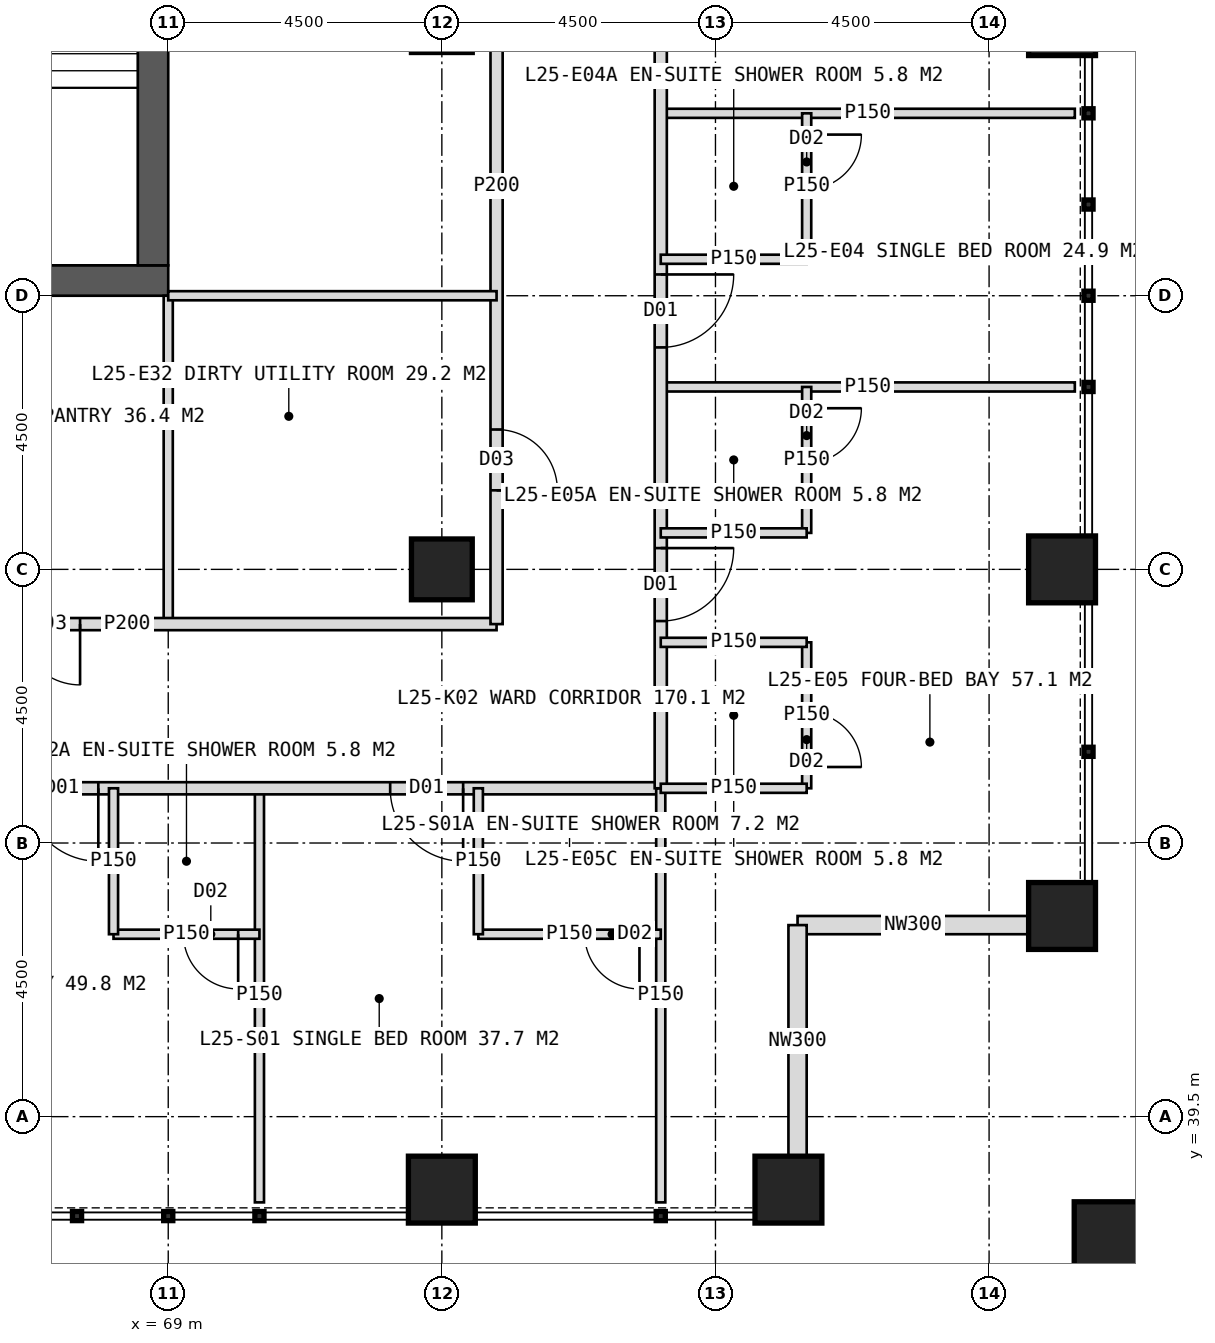
"""IFC4 building model, lengths in metres.
Left out: names, types, materials, properties, quantities, classifications, styles, units other than length and angle.
Written with IfcOpenShell. Run it as: python <this file> out.ifc"""

import sys

from ifc_helpers import new_model, si_unit, direction, frame, frame_2d, origin, origin_2d, place, context, subcontext, project, spatial, rectangle, hollow_rectangle, extrude, element, fill, save


model = new_model("IFC4")
c1 = context("Model", 3, precision=1e-05, world=origin(), true_north=direction((0.0, 1.0)))
c2 = subcontext(c1, "Body", "Model", "MODEL_VIEW")
j1 = project(units=[si_unit("LENGTHUNIT", "METRE"), si_unit("PLANEANGLEUNIT", "RADIAN")], contexts=[c1])
p1 = place(None, origin())
s1 = spatial("IfcSite", under=j1, at=p1, CompositionType="ELEMENT")
p2 = place(p1, origin())
s2 = spatial("IfcBuilding", under=s1, at=p2, CompositionType="ELEMENT")
p3 = place(p2, frame((0.0, 0.0, 108.0)))
s3 = spatial("IfcBuildingStorey", under=s2, at=p3, CompositionType="ELEMENT", Elevation=108.0)
p4 = place(p3, frame((51.0, 53.25, 0.0), z_axis=(0.0, 0.0, 1.0), x_axis=(1.0, 0.0, 0.0)))
e1 = element("IfcWall", 1, at=p4, inside=s3, PredefinedType="SHEAR", context=c2, shape_type="SweptSolid", body=[
    extrude(rectangle(XDim=18.0, YDim=0.5, at=frame_2d((9.0, 0.0))), origin(), (0.0, 0.0, 1.0), 4.0),
])
p5 = place(p4, frame((8.1, 0.0, 0.0)))
e2 = element("IfcOpeningElement", 2, at=p5, cuts=e1, PredefinedType="OPENING", context=c2, shape_type="SweptSolid", body=[
    extrude(rectangle(XDim=1.8, YDim=2.2, at=frame_2d((0.9, 1.1))), frame((0.0, 0.26, 0.0), z_axis=(0.0, -1.0, 0.0), x_axis=(1.0, 0.0, 0.0)), (0.0, 0.0, 1.0), 0.52),
])
p6 = place(p3, frame((68.75, 53.5, 0.0), z_axis=(0.0, 0.0, 1.0), x_axis=(0.0, 1.0, 0.0)))
e3 = element("IfcWall", 3, at=p6, inside=s3, PredefinedType="SHEAR", context=c2, shape_type="SweptSolid", body=[
    extrude(rectangle(XDim=17.0, YDim=0.5, at=frame_2d((8.5, 0.0))), origin(), (0.0, 0.0, 1.0), 4.0),
])
p7 = place(p6, frame((9.5, 0.0, 0.0)))
e4 = element("IfcOpeningElement", 4, at=p7, cuts=e3, PredefinedType="OPENING", context=c2, shape_type="SweptSolid", body=[
    extrude(rectangle(XDim=1.5, YDim=2.2, at=frame_2d((0.75, 1.1))), frame((0.0, 0.26, 0.0), z_axis=(0.0, -1.0, 0.0), x_axis=(1.0, 0.0, 0.0)), (0.0, 0.0, 1.0), 0.52),
])
p8 = place(p3, frame((73.5, 48.5, 0.0), z_axis=(0.0, 0.0, 1.0), x_axis=(1.0, 0.0, 0.0)))
e5 = element("IfcColumn", 5, at=p8, inside=s3, PredefinedType="COLUMN", context=c2, shape_type="SweptSolid", body=[
    extrude(hollow_rectangle(XDim=1.0, YDim=1.0, WallThickness=0.1, at=origin_2d()), origin(), (0.0, 0.0, 1.0), 4.0),
])
for number, where, z_axis, x_axis in (
    (6, (83.7, 42.8, 0.0), (0.0, 0.0, 1.0), (1.0, 0.0, 0.0)),
    (7, (83.7, 48.5, 0.0), (0.0, 0.0, 1.0), (1.0, 0.0, 0.0)),
    (8, (83.7, 57.5, 0.0), (0.0, 0.0, 1.0), (1.0, 0.0, 0.0)),
    (9, (73.5, 38.3, 0.0), (0.0, 0.0, 1.0), (1.0, 0.0, 0.0)),
    (10, (79.2, 38.3, 0.0), (0.0, 0.0, 1.0), (1.0, 0.0, 0.0)),
):
    element("IfcColumn", number, at=place(p3, frame(where, z_axis=z_axis, x_axis=x_axis)), inside=s3, PredefinedType="COLUMN", context=c2, shape_type="SweptSolid", body=[
        extrude(hollow_rectangle(XDim=1.1, YDim=1.1, WallThickness=0.1, at=origin_2d()), origin(), (0.0, 0.0, 1.0), 4.0),
    ])
p9 = place(p3, frame((84.6, 37.4, 0.0), z_axis=(0.0, 0.0, 1.0), x_axis=(1.0, 0.0, 0.0)))
e11 = element("IfcColumn", 11, at=p9, inside=s3, PredefinedType="COLUMN", context=c2, shape_type="SweptSolid", body=[
    extrude(hollow_rectangle(XDim=1.4, YDim=1.4, WallThickness=0.08, at=origin_2d()), origin(), (0.0, 0.0, 1.0), 4.0),
])
for number, where, z_axis, x_axis in (
    (12, (83.15, 42.65, 0.0), (0.0, 0.0, 1.0), (-1.0, 0.0, 0.0)),
    (13, (79.35, 42.65, 0.0), (0.0, 0.0, 1.0), (0.0, -1.0, 0.0)),
):
    element("IfcWall", number, at=place(p3, frame(where, z_axis=z_axis, x_axis=x_axis)), inside=s3, PredefinedType="ELEMENTEDWALL", context=c2, shape_type="SweptSolid", body=[
        extrude(rectangle(XDim=3.8, YDim=0.3, at=frame_2d((1.9, 0.0))), origin(), (0.0, 0.0, 1.0), 4.0),
    ])
p10 = place(p3, frame((70.5, 44.9, 0.0), z_axis=(0.0, 0.0, 1.0), x_axis=(0.0, -1.0, 0.0)))
e14 = element("IfcWall", 14, at=p10, inside=s3, PredefinedType="PARTITIONING", context=c2, shape_type="SweptSolid", body=[
    extrude(rectangle(XDim=6.81, YDim=0.15, at=frame_2d((3.405, 0.0))), origin(), (0.0, 0.0, 1.0), 3.75),
])
p11 = place(p3, frame((77.1, 44.9, 0.0), z_axis=(0.0, 0.0, 1.0), x_axis=(-1.0, 0.0, 0.0)))
e15 = element("IfcWall", 15, at=p11, inside=s3, PredefinedType="PARTITIONING", context=c2, shape_type="SweptSolid", body=[
    extrude(rectangle(XDim=34.2, YDim=0.2, at=frame_2d((17.1, 0.0))), origin(), (0.0, 0.0, 1.0), 3.75),
])
p12 = place(p11, frame((3.25, 0.0, 0.0)))
e16 = element("IfcOpeningElement", 16, at=p12, cuts=e15, PredefinedType="OPENING", context=c2, shape_type="SweptSolid", body=[
    extrude(rectangle(XDim=1.2, YDim=2.2, at=frame_2d((0.6, 1.1))), frame((0.0, 0.11, 0.0), z_axis=(0.0, -1.0, 0.0), x_axis=(1.0, 0.0, 0.0)), (0.0, 0.0, 1.0), 0.22),
])
p13 = place(p11, frame((9.25, 0.0, 0.0)))
e17 = element("IfcOpeningElement", 17, at=p13, cuts=e15, PredefinedType="OPENING", context=c2, shape_type="SweptSolid", body=[
    extrude(rectangle(XDim=1.2, YDim=2.2, at=frame_2d((0.6, 1.1))), frame((0.0, 0.11, 0.0), z_axis=(0.0, -1.0, 0.0), x_axis=(1.0, 0.0, 0.0)), (0.0, 0.0, 1.0), 0.22),
])
p14 = place(p11, frame((18.25, 0.0, 0.0)))
e18 = element("IfcOpeningElement", 18, at=p14, cuts=e15, PredefinedType="OPENING", context=c2, shape_type="SweptSolid", body=[
    extrude(rectangle(XDim=1.2, YDim=2.2, at=frame_2d((0.6, 1.1))), frame((0.0, 0.11, 0.0), z_axis=(0.0, -1.0, 0.0), x_axis=(1.0, 0.0, 0.0)), (0.0, 0.0, 1.0), 0.22),
])
p15 = place(p11, frame((27.25, 0.0, 0.0)))
e19 = element("IfcOpeningElement", 19, at=p15, cuts=e15, PredefinedType="OPENING", context=c2, shape_type="SweptSolid", body=[
    extrude(rectangle(XDim=1.2, YDim=2.2, at=frame_2d((0.6, 1.1))), frame((0.0, 0.11, 0.0), z_axis=(0.0, -1.0, 0.0), x_axis=(1.0, 0.0, 0.0)), (0.0, 0.0, 1.0), 0.22),
])
p16 = place(p3, frame((77.1, 44.9, 0.0), z_axis=(0.0, 0.0, 1.0), x_axis=(0.0, -1.0, 0.0)))
e20 = element("IfcWall", 20, at=p16, inside=s3, PredefinedType="PARTITIONING", context=c2, shape_type="SweptSolid", body=[
    extrude(rectangle(XDim=6.81, YDim=0.15, at=frame_2d((3.405, 0.0))), origin(), (0.0, 0.0, 1.0), 3.75),
])
p17 = place(p3, frame((77.1, 42.5, 0.0), z_axis=(0.0, 0.0, 1.0), x_axis=(-1.0, 0.0, 0.0)))
e21 = element("IfcWall", 21, at=p17, inside=s3, PredefinedType="PARTITIONING", context=c2, shape_type="SweptSolid", body=[
    extrude(rectangle(XDim=3.0, YDim=0.15, at=frame_2d((1.5, 0.0))), origin(), (0.0, 0.0, 1.0), 3.75),
])
p18 = place(p17, frame((0.35, 0.0, 0.0)))
e22 = element("IfcOpeningElement", 22, at=p18, cuts=e21, PredefinedType="OPENING", context=c2, shape_type="SweptSolid", body=[
    extrude(rectangle(XDim=0.9, YDim=2.1, at=frame_2d((0.45, 1.05))), frame((0.0, 0.085, 0.0), z_axis=(0.0, -1.0, 0.0), x_axis=(1.0, 0.0, 0.0)), (0.0, 0.0, 1.0), 0.17),
])
p19 = place(p3, frame((74.1, 44.9, 0.0), z_axis=(0.0, 0.0, 1.0), x_axis=(0.0, -1.0, 0.0)))
e23 = element("IfcWall", 23, at=p19, inside=s3, PredefinedType="PARTITIONING", context=c2, shape_type="SweptSolid", body=[
    extrude(rectangle(XDim=2.4, YDim=0.15, at=frame_2d((1.2, 0.0))), origin(), (0.0, 0.0, 1.0), 3.75),
])
p20 = place(p3, frame((70.5, 42.5, 0.0), z_axis=(0.0, 0.0, 1.0), x_axis=(-1.0, 0.0, 0.0)))
e24 = element("IfcWall", 24, at=p20, inside=s3, PredefinedType="PARTITIONING", context=c2, shape_type="SweptSolid", body=[
    extrude(rectangle(XDim=2.4, YDim=0.15, at=frame_2d((1.2, 0.0))), origin(), (0.0, 0.0, 1.0), 3.75),
])
p21 = place(p20, frame((0.35, 0.0, 0.0)))
e25 = element("IfcOpeningElement", 25, at=p21, cuts=e24, PredefinedType="OPENING", context=c2, shape_type="SweptSolid", body=[
    extrude(rectangle(XDim=0.9, YDim=2.1, at=frame_2d((0.45, 1.05))), frame((0.0, 0.085, 0.0), z_axis=(0.0, -1.0, 0.0), x_axis=(1.0, 0.0, 0.0)), (0.0, 0.0, 1.0), 0.17),
])
p22 = place(p3, frame((68.1, 44.9, 0.0), z_axis=(0.0, 0.0, 1.0), x_axis=(0.0, -1.0, 0.0)))
e26 = element("IfcWall", 26, at=p22, inside=s3, PredefinedType="PARTITIONING", context=c2, shape_type="SweptSolid", body=[
    extrude(rectangle(XDim=2.4, YDim=0.15, at=frame_2d((1.2, 0.0))), origin(), (0.0, 0.0, 1.0), 3.75),
])
p23 = place(p3, frame((69.0, 53.0, 0.0), z_axis=(0.0, 0.0, 1.0), x_axis=(0.0, -1.0, 0.0)))
e27 = element("IfcWall", 27, at=p23, inside=s3, PredefinedType="PARTITIONING", context=c2, shape_type="SweptSolid", body=[
    extrude(rectangle(XDim=5.4, YDim=0.15, at=frame_2d((2.7, 0.0))), origin(), (0.0, 0.0, 1.0), 3.75),
])
p24 = place(p3, frame((74.4, 47.6, 0.0), z_axis=(0.0, 0.0, 1.0), x_axis=(-1.0, 0.0, 0.0)))
e28 = element("IfcWall", 28, at=p24, inside=s3, PredefinedType="PARTITIONING", context=c2, shape_type="SweptSolid", body=[
    extrude(rectangle(XDim=12.15, YDim=0.2, at=frame_2d((6.075, 0.0))), origin(), (0.0, 0.0, 1.0), 3.75),
])
p25 = place(p24, frame((6.85, 0.0, 0.0)))
e29 = element("IfcOpeningElement", 29, at=p25, cuts=e28, PredefinedType="OPENING", context=c2, shape_type="SweptSolid", body=[
    extrude(rectangle(XDim=1.0, YDim=2.1, at=frame_2d((0.5, 1.05))), frame((0.0, 0.11, 0.0), z_axis=(0.0, -1.0, 0.0), x_axis=(1.0, 0.0, 0.0)), (0.0, 0.0, 1.0), 0.22),
])
for number, where, z_axis, x_axis in (
    (30, (77.1, 56.0, 0.0), (0.0, 0.0, 1.0), (1.0, 0.0, 0.0)),
    (31, (77.1, 51.5, 0.0), (0.0, 0.0, 1.0), (1.0, 0.0, 0.0)),
):
    element("IfcWall", number, at=place(p3, frame(where, z_axis=z_axis, x_axis=x_axis)), inside=s3, PredefinedType="PARTITIONING", context=c2, shape_type="SweptSolid", body=[
        extrude(rectangle(XDim=6.81, YDim=0.15, at=frame_2d((3.405, 0.0))), origin(), (0.0, 0.0, 1.0), 3.75),
    ])
p26 = place(p3, frame((77.1, 79.1, 0.0), z_axis=(0.0, 0.0, 1.0), x_axis=(0.0, -1.0, 0.0)))
e32 = element("IfcWall", 32, at=p26, inside=s3, PredefinedType="PARTITIONING", context=c2, shape_type="SweptSolid", body=[
    extrude(rectangle(XDim=34.2, YDim=0.2, at=frame_2d((17.1, 0.0))), origin(), (0.0, 0.0, 1.0), 3.75),
])
p27 = place(p26, frame((2.65, 0.0, 0.0)))
e33 = element("IfcOpeningElement", 33, at=p27, cuts=e32, PredefinedType="OPENING", context=c2, shape_type="SweptSolid", body=[
    extrude(rectangle(XDim=1.2, YDim=2.2, at=frame_2d((0.6, 1.1))), frame((0.0, 0.11, 0.0), z_axis=(0.0, -1.0, 0.0), x_axis=(1.0, 0.0, 0.0)), (0.0, 0.0, 1.0), 0.22),
])
p28 = place(p26, frame((10.75, 0.0, 0.0)))
e34 = element("IfcOpeningElement", 34, at=p28, cuts=e32, PredefinedType="OPENING", context=c2, shape_type="SweptSolid", body=[
    extrude(rectangle(XDim=1.2, YDim=2.2, at=frame_2d((0.6, 1.1))), frame((0.0, 0.11, 0.0), z_axis=(0.0, -1.0, 0.0), x_axis=(1.0, 0.0, 0.0)), (0.0, 0.0, 1.0), 0.22),
])
p29 = place(p26, frame((19.75, 0.0, 0.0)))
e35 = element("IfcOpeningElement", 35, at=p29, cuts=e32, PredefinedType="OPENING", context=c2, shape_type="SweptSolid", body=[
    extrude(rectangle(XDim=1.2, YDim=2.2, at=frame_2d((0.6, 1.1))), frame((0.0, 0.11, 0.0), z_axis=(0.0, -1.0, 0.0), x_axis=(1.0, 0.0, 0.0)), (0.0, 0.0, 1.0), 0.22),
])
p30 = place(p26, frame((25.75, 0.0, 0.0)))
e36 = element("IfcOpeningElement", 36, at=p30, cuts=e32, PredefinedType="OPENING", context=c2, shape_type="SweptSolid", body=[
    extrude(rectangle(XDim=1.2, YDim=2.2, at=frame_2d((0.6, 1.1))), frame((0.0, 0.11, 0.0), z_axis=(0.0, -1.0, 0.0), x_axis=(1.0, 0.0, 0.0)), (0.0, 0.0, 1.0), 0.22),
])
p31 = place(p26, frame((30.25, 0.0, 0.0)))
e37 = element("IfcOpeningElement", 37, at=p31, cuts=e32, PredefinedType="OPENING", context=c2, shape_type="SweptSolid", body=[
    extrude(rectangle(XDim=1.2, YDim=2.2, at=frame_2d((0.6, 1.1))), frame((0.0, 0.11, 0.0), z_axis=(0.0, -1.0, 0.0), x_axis=(1.0, 0.0, 0.0)), (0.0, 0.0, 1.0), 0.22),
])
p32 = place(p3, frame((79.5, 56.0, 0.0), z_axis=(0.0, 0.0, 1.0), x_axis=(0.0, -1.0, 0.0)))
e38 = element("IfcWall", 38, at=p32, inside=s3, PredefinedType="PARTITIONING", context=c2, shape_type="SweptSolid", body=[
    extrude(rectangle(XDim=2.4, YDim=0.15, at=frame_2d((1.2, 0.0))), origin(), (0.0, 0.0, 1.0), 3.75),
])
p33 = place(p32, frame((0.35, 0.0, 0.0)))
e39 = element("IfcOpeningElement", 39, at=p33, cuts=e38, PredefinedType="OPENING", context=c2, shape_type="SweptSolid", body=[
    extrude(rectangle(XDim=0.9, YDim=2.1, at=frame_2d((0.45, 1.05))), frame((0.0, 0.085, 0.0), z_axis=(0.0, -1.0, 0.0), x_axis=(1.0, 0.0, 0.0)), (0.0, 0.0, 1.0), 0.17),
])
p34 = place(p3, frame((77.1, 53.6, 0.0), z_axis=(0.0, 0.0, 1.0), x_axis=(1.0, 0.0, 0.0)))
e40 = element("IfcWall", 40, at=p34, inside=s3, PredefinedType="PARTITIONING", context=c2, shape_type="SweptSolid", body=[
    extrude(rectangle(XDim=2.4, YDim=0.15, at=frame_2d((1.2, 0.0))), origin(), (0.0, 0.0, 1.0), 3.75),
])
p35 = place(p3, frame((79.5, 51.5, 0.0), z_axis=(0.0, 0.0, 1.0), x_axis=(0.0, -1.0, 0.0)))
e41 = element("IfcWall", 41, at=p35, inside=s3, PredefinedType="PARTITIONING", context=c2, shape_type="SweptSolid", body=[
    extrude(rectangle(XDim=2.4, YDim=0.15, at=frame_2d((1.2, 0.0))), origin(), (0.0, 0.0, 1.0), 3.75),
])
p36 = place(p35, frame((0.35, 0.0, 0.0)))
e42 = element("IfcOpeningElement", 42, at=p36, cuts=e41, PredefinedType="OPENING", context=c2, shape_type="SweptSolid", body=[
    extrude(rectangle(XDim=0.9, YDim=2.1, at=frame_2d((0.45, 1.05))), frame((0.0, 0.085, 0.0), z_axis=(0.0, -1.0, 0.0), x_axis=(1.0, 0.0, 0.0)), (0.0, 0.0, 1.0), 0.17),
])
p37 = place(p3, frame((77.1, 49.1, 0.0), z_axis=(0.0, 0.0, 1.0), x_axis=(1.0, 0.0, 0.0)))
e43 = element("IfcWall", 43, at=p37, inside=s3, PredefinedType="PARTITIONING", context=c2, shape_type="SweptSolid", body=[
    extrude(rectangle(XDim=2.4, YDim=0.15, at=frame_2d((1.2, 0.0))), origin(), (0.0, 0.0, 1.0), 3.75),
])
p38 = place(p3, frame((79.5, 47.3, 0.0), z_axis=(0.0, 0.0, 1.0), x_axis=(0.0, -1.0, 0.0)))
e44 = element("IfcWall", 44, at=p38, inside=s3, PredefinedType="PARTITIONING", context=c2, shape_type="SweptSolid", body=[
    extrude(rectangle(XDim=2.4, YDim=0.15, at=frame_2d((1.2, 0.0))), origin(), (0.0, 0.0, 1.0), 3.75),
])
p39 = place(p38, frame((1.15, 0.0, 0.0)))
e45 = element("IfcOpeningElement", 45, at=p39, cuts=e44, PredefinedType="OPENING", context=c2, shape_type="SweptSolid", body=[
    extrude(rectangle(XDim=0.9, YDim=2.1, at=frame_2d((0.45, 1.05))), frame((0.0, 0.085, 0.0), z_axis=(0.0, -1.0, 0.0), x_axis=(1.0, 0.0, 0.0)), (0.0, 0.0, 1.0), 0.17),
])
for number, where, z_axis, x_axis in (
    (46, (77.1, 47.3, 0.0), (0.0, 0.0, 1.0), (1.0, 0.0, 0.0)),
    (47, (77.1, 44.9, 0.0), (0.0, 0.0, 1.0), (1.0, 0.0, 0.0)),
):
    element("IfcWall", number, at=place(p3, frame(where, z_axis=z_axis, x_axis=x_axis)), inside=s3, PredefinedType="PARTITIONING", context=c2, shape_type="SweptSolid", body=[
        extrude(rectangle(XDim=2.4, YDim=0.15, at=frame_2d((1.2, 0.0))), origin(), (0.0, 0.0, 1.0), 3.75),
    ])
p40 = place(p3, frame((74.4, 62.0, 0.0), z_axis=(0.0, 0.0, 1.0), x_axis=(0.0, -1.0, 0.0)))
e48 = element("IfcWall", 48, at=p40, inside=s3, PredefinedType="PARTITIONING", context=c2, shape_type="SweptSolid", body=[
    extrude(rectangle(XDim=14.4, YDim=0.2, at=frame_2d((7.2, 0.0))), origin(), (0.0, 0.0, 1.0), 3.75),
])
p41 = place(p40, frame((1.45, 0.0, 0.0)))
e49 = element("IfcOpeningElement", 49, at=p41, cuts=e48, PredefinedType="OPENING", context=c2, shape_type="SweptSolid", body=[
    extrude(rectangle(XDim=1.0, YDim=2.1, at=frame_2d((0.5, 1.05))), frame((0.0, 0.11, 0.0), z_axis=(0.0, -1.0, 0.0), x_axis=(1.0, 0.0, 0.0)), (0.0, 0.0, 1.0), 0.22),
])
p42 = place(p40, frame((11.2, 0.0, 0.0)))
e50 = element("IfcOpeningElement", 50, at=p42, cuts=e48, PredefinedType="OPENING", context=c2, shape_type="SweptSolid", body=[
    extrude(rectangle(XDim=1.0, YDim=2.1, at=frame_2d((0.5, 1.05))), frame((0.0, 0.11, 0.0), z_axis=(0.0, -1.0, 0.0), x_axis=(1.0, 0.0, 0.0)), (0.0, 0.0, 1.0), 0.22),
])
p43 = place(p3, frame((69.0, 53.0, 0.0), z_axis=(0.0, 0.0, 1.0), x_axis=(1.0, 0.0, 0.0)))
e51 = element("IfcWall", 51, at=p43, inside=s3, PredefinedType="PARTITIONING", context=c2, shape_type="SweptSolid", body=[
    extrude(rectangle(XDim=5.4, YDim=0.15, at=frame_2d((2.7, 0.0))), origin(), (0.0, 0.0, 1.0), 3.75),
])
p44 = place(p12, origin())
e52 = element("IfcDoor", 52, at=p44, inside=s3, OperationType="SINGLE_SWING_LEFT", PredefinedType="DOOR", context=c2, shape_type="SweptSolid", body=[
    extrude(rectangle(XDim=1.2, YDim=2.2, at=frame_2d((0.6, 1.1))), frame((0.0, 0.025, 0.0), z_axis=(0.0, -1.0, 0.0), x_axis=(1.0, 0.0, 0.0)), (0.0, 0.0, 1.0), 0.05),
])
fill(e16, e52)
p45 = place(p18, origin())
e53 = element("IfcDoor", 53, at=p45, inside=s3, OperationType="SINGLE_SWING_LEFT", PredefinedType="DOOR", context=c2, shape_type="SweptSolid", body=[
    extrude(rectangle(XDim=0.9, YDim=2.1, at=frame_2d((0.45, 1.05))), frame((0.0, 0.025, 0.0), z_axis=(0.0, -1.0, 0.0), x_axis=(1.0, 0.0, 0.0)), (0.0, 0.0, 1.0), 0.05),
])
fill(e22, e53)
p46 = place(p13, origin())
e54 = element("IfcDoor", 54, at=p46, inside=s3, OperationType="SINGLE_SWING_LEFT", PredefinedType="DOOR", context=c2, shape_type="SweptSolid", body=[
    extrude(rectangle(XDim=1.2, YDim=2.2, at=frame_2d((0.6, 1.1))), frame((0.0, 0.025, 0.0), z_axis=(0.0, -1.0, 0.0), x_axis=(1.0, 0.0, 0.0)), (0.0, 0.0, 1.0), 0.05),
])
fill(e17, e54)
p47 = place(p21, origin())
e55 = element("IfcDoor", 55, at=p47, inside=s3, OperationType="SINGLE_SWING_LEFT", PredefinedType="DOOR", context=c2, shape_type="SweptSolid", body=[
    extrude(rectangle(XDim=0.9, YDim=2.1, at=frame_2d((0.45, 1.05))), frame((0.0, 0.025, 0.0), z_axis=(0.0, -1.0, 0.0), x_axis=(1.0, 0.0, 0.0)), (0.0, 0.0, 1.0), 0.05),
])
fill(e25, e55)
p48 = place(p25, origin())
e56 = element("IfcDoor", 56, at=p48, inside=s3, OperationType="SINGLE_SWING_LEFT", PredefinedType="DOOR", context=c2, shape_type="SweptSolid", body=[
    extrude(rectangle(XDim=1.0, YDim=2.1, at=frame_2d((0.5, 1.05))), frame((0.0, 0.025, 0.0), z_axis=(0.0, -1.0, 0.0), x_axis=(1.0, 0.0, 0.0)), (0.0, 0.0, 1.0), 0.05),
])
fill(e29, e56)
p49 = place(p30, origin())
e57 = element("IfcDoor", 57, at=p49, inside=s3, OperationType="SINGLE_SWING_LEFT", PredefinedType="DOOR", context=c2, shape_type="SweptSolid", body=[
    extrude(rectangle(XDim=1.2, YDim=2.2, at=frame_2d((0.6, 1.1))), frame((0.0, 0.025, 0.0), z_axis=(0.0, -1.0, 0.0), x_axis=(1.0, 0.0, 0.0)), (0.0, 0.0, 1.0), 0.05),
])
fill(e36, e57)
p50 = place(p33, origin())
e58 = element("IfcDoor", 58, at=p50, inside=s3, OperationType="SINGLE_SWING_LEFT", PredefinedType="DOOR", context=c2, shape_type="SweptSolid", body=[
    extrude(rectangle(XDim=0.9, YDim=2.1, at=frame_2d((0.45, 1.05))), frame((0.0, 0.025, 0.0), z_axis=(0.0, -1.0, 0.0), x_axis=(1.0, 0.0, 0.0)), (0.0, 0.0, 1.0), 0.05),
])
fill(e39, e58)
p51 = place(p31, origin())
e59 = element("IfcDoor", 59, at=p51, inside=s3, OperationType="SINGLE_SWING_LEFT", PredefinedType="DOOR", context=c2, shape_type="SweptSolid", body=[
    extrude(rectangle(XDim=1.2, YDim=2.2, at=frame_2d((0.6, 1.1))), frame((0.0, 0.025, 0.0), z_axis=(0.0, -1.0, 0.0), x_axis=(1.0, 0.0, 0.0)), (0.0, 0.0, 1.0), 0.05),
])
fill(e37, e59)
p52 = place(p36, origin())
e60 = element("IfcDoor", 60, at=p52, inside=s3, OperationType="SINGLE_SWING_LEFT", PredefinedType="DOOR", context=c2, shape_type="SweptSolid", body=[
    extrude(rectangle(XDim=0.9, YDim=2.1, at=frame_2d((0.45, 1.05))), frame((0.0, 0.025, 0.0), z_axis=(0.0, -1.0, 0.0), x_axis=(1.0, 0.0, 0.0)), (0.0, 0.0, 1.0), 0.05),
])
fill(e42, e60)
p53 = place(p39, origin())
e61 = element("IfcDoor", 61, at=p53, inside=s3, OperationType="SINGLE_SWING_RIGHT", PredefinedType="DOOR", context=c2, shape_type="SweptSolid", body=[
    extrude(rectangle(XDim=0.9, YDim=2.1, at=frame_2d((0.45, 1.05))), frame((0.0, 0.025, 0.0), z_axis=(0.0, -1.0, 0.0), x_axis=(1.0, 0.0, 0.0)), (0.0, 0.0, 1.0), 0.05),
])
fill(e45, e61)
p54 = place(p42, origin())
e62 = element("IfcDoor", 62, at=p54, inside=s3, OperationType="SINGLE_SWING_RIGHT", PredefinedType="DOOR", context=c2, shape_type="SweptSolid", body=[
    extrude(rectangle(XDim=1.0, YDim=2.1, at=frame_2d((0.5, 1.05))), frame((0.0, 0.025, 0.0), z_axis=(0.0, -1.0, 0.0), x_axis=(1.0, 0.0, 0.0)), (0.0, 0.0, 1.0), 0.05),
])
fill(e50, e62)
save(model, sys.argv[1])
